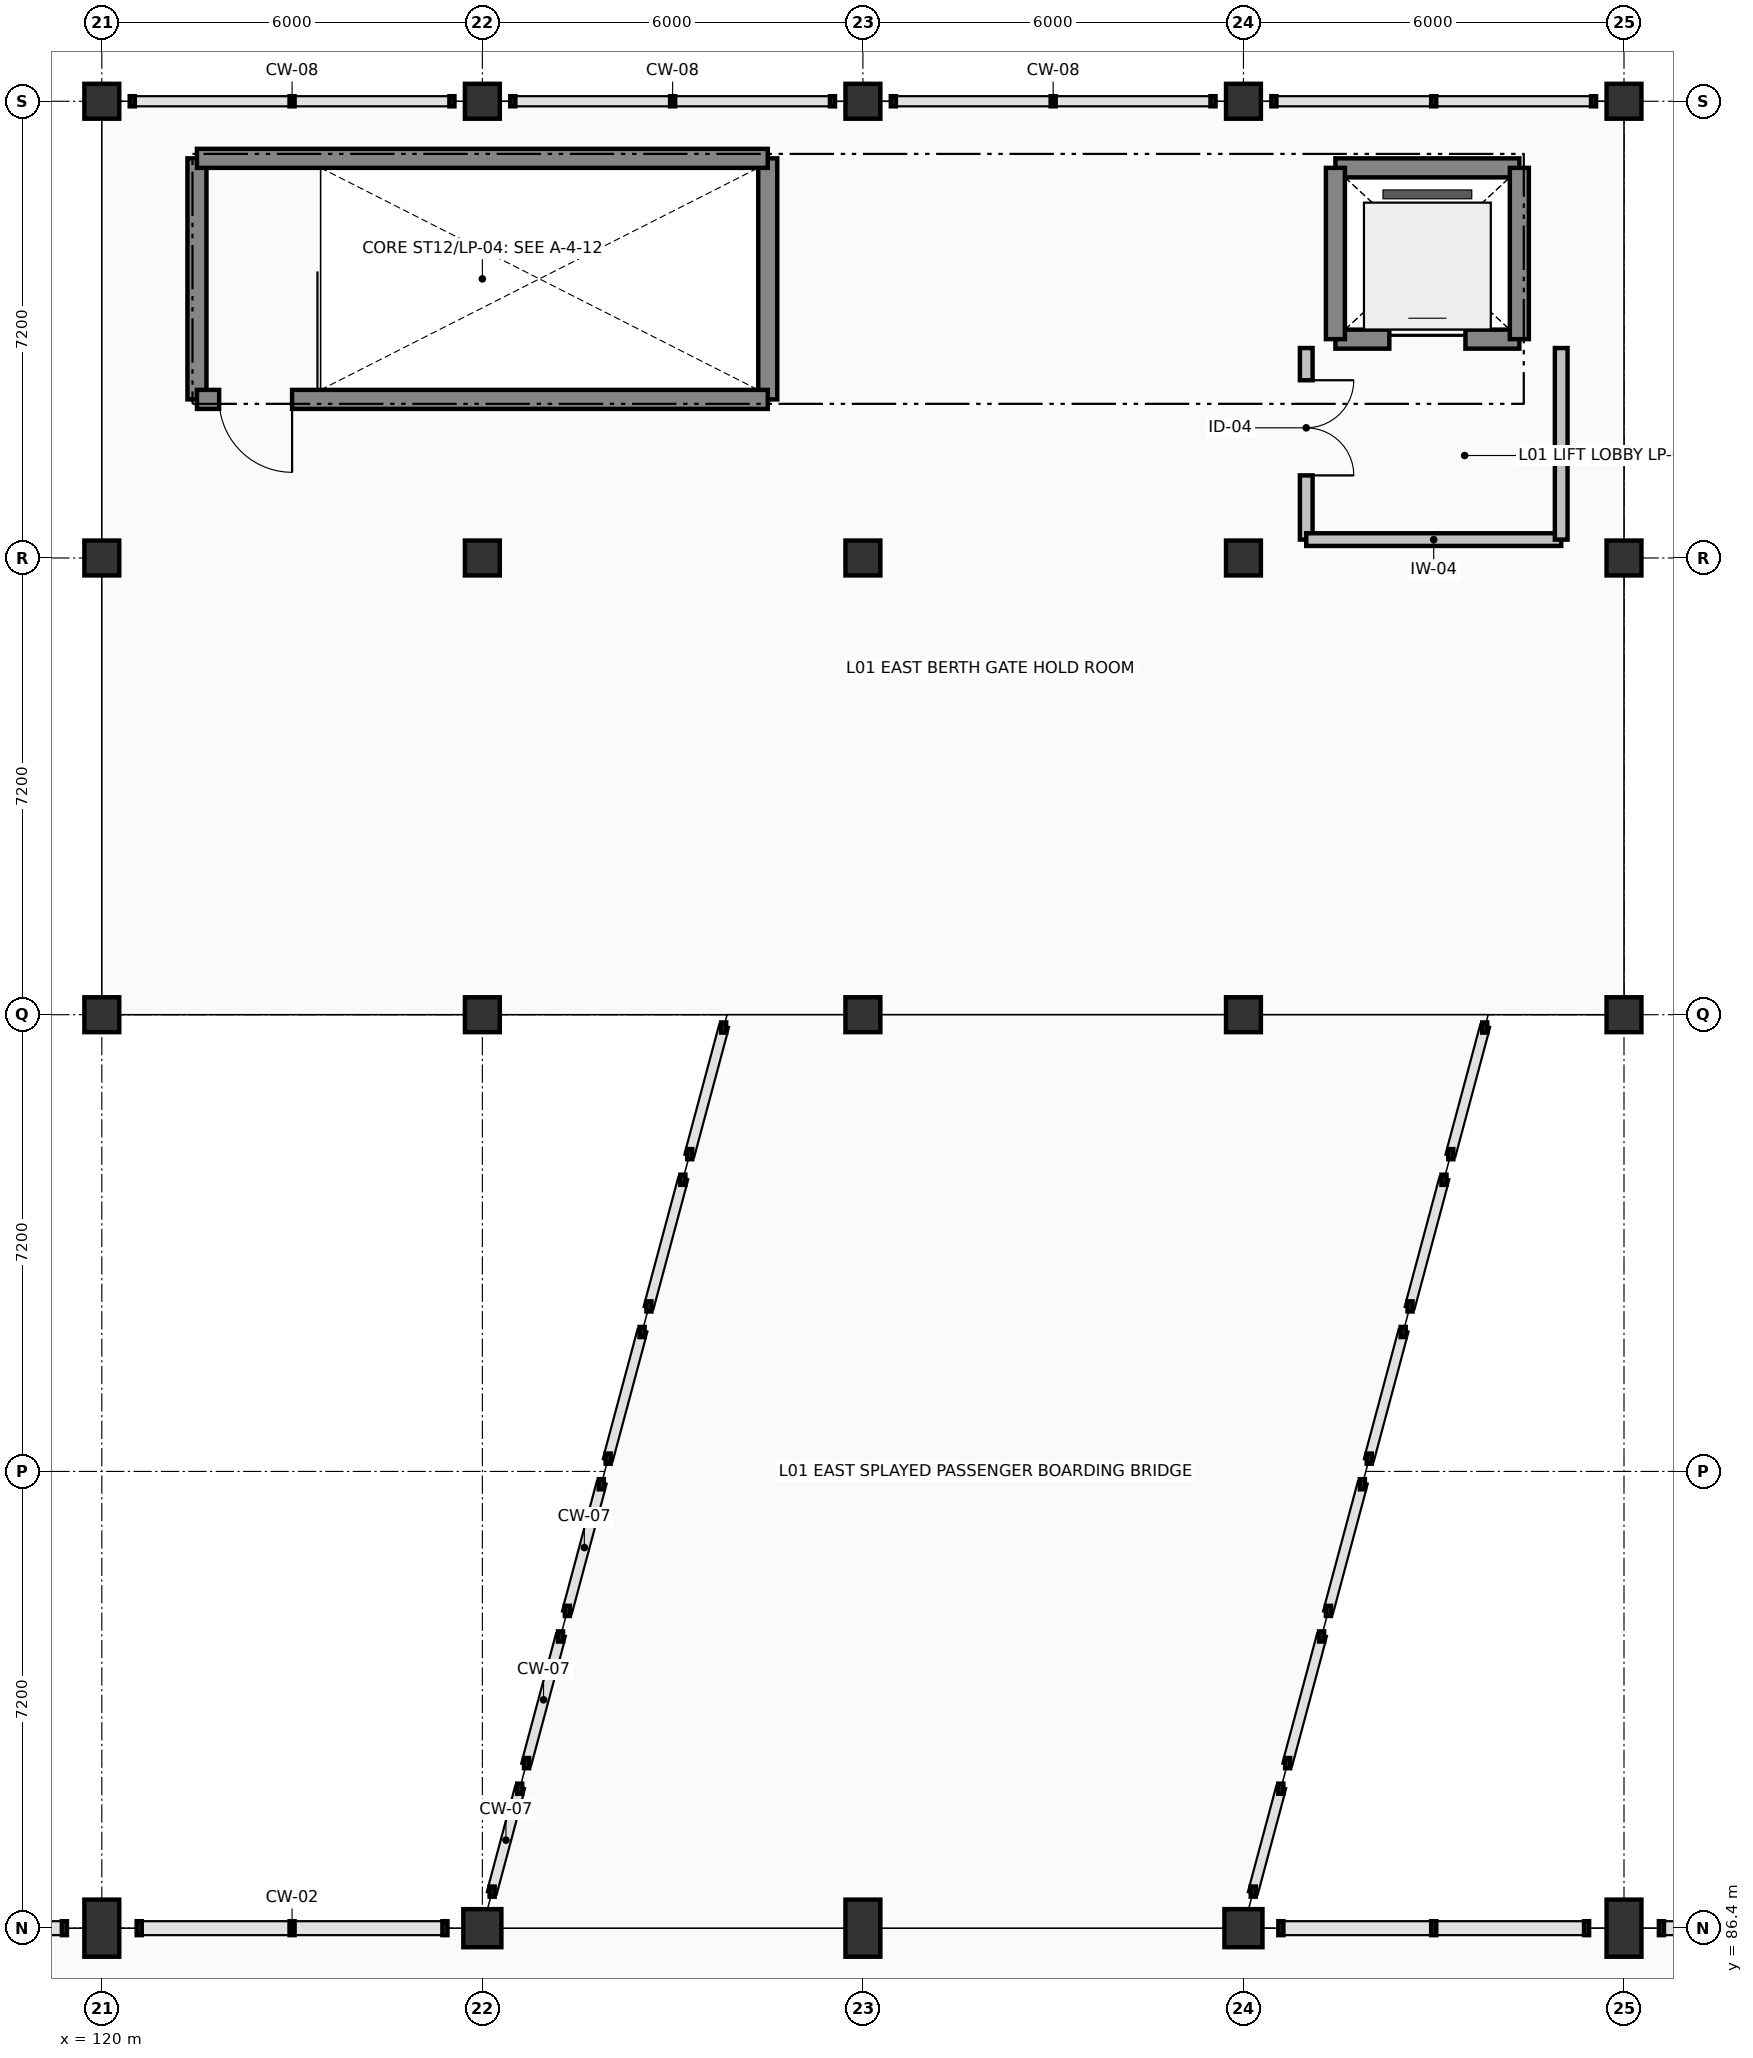
"""IFC4 building model, lengths in metres.
Left out: names, types, materials, properties, quantities, classifications, styles, units other than length and angle.
Written with IfcOpenShell. Run it as: python <this file> out.ifc"""

import sys

from ifc_helpers import new_model, si_unit, direction, frame, frame_2d, origin, origin_2d, place, context, subcontext, project, spatial, rectangle, extrude, element, fill, save


model = new_model("IFC4")
c1 = context("Model", 3, precision=1e-05, world=origin(), true_north=direction((0.0, 1.0)))
c2 = subcontext(c1, "Body", "Model", "MODEL_VIEW")
j1 = project(units=[si_unit("LENGTHUNIT", "METRE"), si_unit("PLANEANGLEUNIT", "RADIAN")], contexts=[c1])
p1 = place(None, origin())
s1 = spatial("IfcSite", under=j1, at=p1, CompositionType="ELEMENT")
p2 = place(p1, origin())
s2 = spatial("IfcBuilding", under=s1, at=p2, CompositionType="ELEMENT")
p3 = place(p2, frame((0.0, 0.0, 5.76)))
s3 = spatial("IfcBuildingStorey", under=s2, at=p3, CompositionType="ELEMENT", Elevation=5.76)
for number, where, z_axis, x_axis in (
    (1, (121.5, 110.5, 0.0), (0.0, 0.0, 1.0), (0.0, 1.0, 0.0)),
    (2, (130.5, 110.5, 0.0), (0.0, 0.0, 1.0), (0.0, 1.0, 0.0)),
):
    element("IfcWall", number, at=place(p3, frame(where, z_axis=z_axis, x_axis=x_axis)), inside=s3, PredefinedType="SHEAR", context=c2, shape_type="SweptSolid", body=[
        extrude(rectangle(XDim=3.8, YDim=0.3, at=frame_2d((1.9, 0.0))), origin(), (0.0, 0.0, 1.0), 3.78),
    ])
p4 = place(p3, frame((120.0, 86.4, 0.0), z_axis=(0.0, 0.0, 1.0), x_axis=(1.0, 0.0, 0.0)))
e3 = element("IfcColumn", 3, at=p4, inside=s3, PredefinedType="COLUMN", context=c2, shape_type="SweptSolid", body=[
    extrude(rectangle(XDim=0.55, YDim=0.9, at=origin_2d()), origin(), (0.0, 0.0, 1.0), 4.08),
])
p5 = place(p3, frame((126.0, 86.4, 0.0), z_axis=(0.0, 0.0, 1.0), x_axis=(1.0, 0.0, 0.0)))
e4 = element("IfcColumn", 4, at=p5, inside=s3, PredefinedType="COLUMN", context=c2, shape_type="SweptSolid", body=[
    extrude(rectangle(XDim=0.6, YDim=0.6, at=origin_2d()), origin(), (0.0, 0.0, 1.0), 4.08),
])
p6 = place(p3, frame((132.0, 86.4, 0.0), z_axis=(0.0, 0.0, 1.0), x_axis=(1.0, 0.0, 0.0)))
e5 = element("IfcColumn", 5, at=p6, inside=s3, PredefinedType="COLUMN", context=c2, shape_type="SweptSolid", body=[
    extrude(rectangle(XDim=0.55, YDim=0.9, at=origin_2d()), origin(), (0.0, 0.0, 1.0), 4.08),
])
p7 = place(p3, frame((138.0, 86.4, 0.0), z_axis=(0.0, 0.0, 1.0), x_axis=(1.0, 0.0, 0.0)))
e6 = element("IfcColumn", 6, at=p7, inside=s3, PredefinedType="COLUMN", context=c2, shape_type="SweptSolid", body=[
    extrude(rectangle(XDim=0.6, YDim=0.6, at=origin_2d()), origin(), (0.0, 0.0, 1.0), 4.08),
])
p8 = place(p3, frame((144.0, 86.4, 0.0), z_axis=(0.0, 0.0, 1.0), x_axis=(1.0, 0.0, 0.0)))
e7 = element("IfcColumn", 7, at=p8, inside=s3, PredefinedType="COLUMN", context=c2, shape_type="SweptSolid", body=[
    extrude(rectangle(XDim=0.55, YDim=0.9, at=origin_2d()), origin(), (0.0, 0.0, 1.0), 4.08),
])
for number, where, z_axis, x_axis in (
    (8, (120.0, 100.8, 0.0), (0.0, 0.0, 1.0), (1.0, 0.0, 0.0)),
    (9, (120.0, 108.0, 0.0), (0.0, 0.0, 1.0), (1.0, 0.0, 0.0)),
    (10, (120.0, 115.2, 0.0), (0.0, 0.0, 1.0), (1.0, 0.0, 0.0)),
    (11, (126.0, 100.8, 0.0), (0.0, 0.0, 1.0), (1.0, 0.0, 0.0)),
    (12, (126.0, 108.0, 0.0), (0.0, 0.0, 1.0), (1.0, 0.0, 0.0)),
    (13, (126.0, 115.2, 0.0), (0.0, 0.0, 1.0), (1.0, 0.0, 0.0)),
    (14, (132.0, 100.8, 0.0), (0.0, 0.0, 1.0), (1.0, 0.0, 0.0)),
    (15, (132.0, 108.0, 0.0), (0.0, 0.0, 1.0), (1.0, 0.0, 0.0)),
    (16, (132.0, 115.2, 0.0), (0.0, 0.0, 1.0), (1.0, 0.0, 0.0)),
    (17, (138.0, 100.8, 0.0), (0.0, 0.0, 1.0), (1.0, 0.0, 0.0)),
    (18, (138.0, 108.0, 0.0), (0.0, 0.0, 1.0), (1.0, 0.0, 0.0)),
    (19, (138.0, 115.2, 0.0), (0.0, 0.0, 1.0), (1.0, 0.0, 0.0)),
    (20, (144.0, 100.8, 0.0), (0.0, 0.0, 1.0), (1.0, 0.0, 0.0)),
    (21, (144.0, 108.0, 0.0), (0.0, 0.0, 1.0), (1.0, 0.0, 0.0)),
    (22, (144.0, 115.2, 0.0), (0.0, 0.0, 1.0), (1.0, 0.0, 0.0)),
):
    element("IfcColumn", number, at=place(p3, frame(where, z_axis=z_axis, x_axis=x_axis)), inside=s3, PredefinedType="COLUMN", context=c2, shape_type="SweptSolid", body=[
        extrude(rectangle(XDim=0.55, YDim=0.55, at=origin_2d()), origin(), (0.0, 0.0, 1.0), 4.08),
    ])
p9 = place(p3, frame((121.5, 114.3, 0.0), z_axis=(0.0, 0.0, 1.0), x_axis=(1.0, 0.0, 0.0)))
e23 = element("IfcWall", 23, at=p9, inside=s3, PredefinedType="SHEAR", context=c2, shape_type="SweptSolid", body=[
    extrude(rectangle(XDim=9.0, YDim=0.3, at=frame_2d((4.5, 0.0))), origin(), (0.0, 0.0, 1.0), 3.78),
])
p10 = place(p3, frame((121.5, 110.5, 0.0), z_axis=(0.0, 0.0, 1.0), x_axis=(1.0, 0.0, 0.0)))
e24 = element("IfcWall", 24, at=p10, inside=s3, PredefinedType="SHEAR", context=c2, shape_type="SweptSolid", body=[
    extrude(rectangle(XDim=9.0, YDim=0.3, at=frame_2d((4.5, 0.0))), origin(), (0.0, 0.0, 1.0), 3.78),
])
p11 = place(p10, frame((0.35, 0.0, 0.0)))
e25 = element("IfcOpeningElement", 25, at=p11, cuts=e24, PredefinedType="OPENING", context=c2, shape_type="SweptSolid", body=[
    extrude(rectangle(XDim=1.15, YDim=2.15, at=frame_2d((0.575, 1.075))), frame((0.0, 0.16, 0.0), z_axis=(0.0, -1.0, 0.0), x_axis=(1.0, 0.0, 0.0)), (0.0, 0.0, 1.0), 0.32),
])
p12 = place(p3, frame((139.45, 111.45, 0.0), z_axis=(0.0, 0.0, 1.0), x_axis=(1.0, 0.0, 0.0)))
e26 = element("IfcWall", 26, at=p12, inside=s3, PredefinedType="SHEAR", context=c2, shape_type="SweptSolid", body=[
    extrude(rectangle(XDim=2.9, YDim=0.3, at=frame_2d((1.45, 0.0))), origin(), (0.0, 0.0, 1.0), 3.78),
])
p13 = place(p12, frame((0.85, 0.0, 0.0)))
e27 = element("IfcOpeningElement", 27, at=p13, cuts=e26, PredefinedType="OPENING", context=c2, shape_type="SweptSolid", body=[
    extrude(rectangle(XDim=1.2, YDim=2.15, at=frame_2d((0.6, 1.075))), frame((0.0, 0.16, 0.0), z_axis=(0.0, -1.0, 0.0), x_axis=(1.0, 0.0, 0.0)), (0.0, 0.0, 1.0), 0.32),
])
p14 = place(p3, frame((139.45, 114.15, 0.0), z_axis=(0.0, 0.0, 1.0), x_axis=(1.0, 0.0, 0.0)))
e28 = element("IfcWall", 28, at=p14, inside=s3, PredefinedType="SHEAR", context=c2, shape_type="SweptSolid", body=[
    extrude(rectangle(XDim=2.9, YDim=0.3, at=frame_2d((1.45, 0.0))), origin(), (0.0, 0.0, 1.0), 3.78),
])
for number, where, z_axis, x_axis in (
    (29, (139.45, 111.45, 0.0), (0.0, 0.0, 1.0), (0.0, 1.0, 0.0)),
    (30, (142.35, 111.45, 0.0), (0.0, 0.0, 1.0), (0.0, 1.0, 0.0)),
):
    element("IfcWall", number, at=place(p3, frame(where, z_axis=z_axis, x_axis=x_axis)), inside=s3, PredefinedType="SHEAR", context=c2, shape_type="SweptSolid", body=[
        extrude(rectangle(XDim=2.7, YDim=0.3, at=frame_2d((1.35, 0.0))), origin(), (0.0, 0.0, 1.0), 3.78),
    ])
p15 = place(p3, frame((138.99, 111.31, 0.0), z_axis=(0.0, 0.0, 1.0), x_axis=(0.0, -1.0, 0.0)))
e31 = element("IfcWall", 31, at=p15, inside=s3, PredefinedType="PARTITIONING", context=c2, shape_type="SweptSolid", body=[
    extrude(rectangle(XDim=3.02, YDim=0.2, at=frame_2d((1.51, 0.0))), origin(), (0.0, 0.0, 1.0), 3.82),
])
p16 = place(p15, frame((0.508, 0.0, 0.0)))
e32 = element("IfcOpeningElement", 32, at=p16, cuts=e31, PredefinedType="OPENING", context=c2, shape_type="SweptSolid", body=[
    extrude(rectangle(XDim=1.5, YDim=2.2, at=frame_2d((0.75, 1.1))), frame((0.0, 0.11, 0.0), z_axis=(0.0, -1.0, 0.0), x_axis=(1.0, 0.0, 0.0)), (0.0, 0.0, 1.0), 0.22),
])
p17 = place(p3, frame((138.99, 108.29, 0.0), z_axis=(0.0, 0.0, 1.0), x_axis=(1.0, 0.0, 0.0)))
e33 = element("IfcWall", 33, at=p17, inside=s3, PredefinedType="PARTITIONING", context=c2, shape_type="SweptSolid", body=[
    extrude(rectangle(XDim=4.02, YDim=0.2, at=frame_2d((2.01, 0.0))), origin(), (0.0, 0.0, 1.0), 3.18),
])
p18 = place(p3, frame((143.01, 108.29, 0.0), z_axis=(0.0, 0.0, 1.0), x_axis=(0.0, 1.0, 0.0)))
e34 = element("IfcWall", 34, at=p18, inside=s3, PredefinedType="PARTITIONING", context=c2, shape_type="SweptSolid", body=[
    extrude(rectangle(XDim=3.02, YDim=0.2, at=frame_2d((1.51, 0.0))), origin(), (0.0, 0.0, 1.0), 3.82),
])
p19 = place(p11, frame((1.15, 0.0, 0.0), z_axis=(0.0, 0.0, 1.0), x_axis=(-1.0, 0.0, 0.0)))
e35 = element("IfcDoor", 35, at=p19, inside=s3, OperationType="SINGLE_SWING_LEFT", PredefinedType="DOOR", context=c2, shape_type="SweptSolid", body=[
    extrude(rectangle(XDim=1.15, YDim=2.15, at=frame_2d((0.575, 1.075))), frame((0.0, 0.025, 0.0), z_axis=(0.0, -1.0, 0.0), x_axis=(1.0, 0.0, 0.0)), (0.0, 0.0, 1.0), 0.05),
])
fill(e25, e35)
p20 = place(p13, origin())
e36 = element("IfcDoor", 36, at=p20, inside=s3, OperationType="SLIDING_TO_LEFT", PredefinedType="DOOR", context=c2, shape_type="SweptSolid", body=[
    extrude(rectangle(XDim=1.2, YDim=2.15, at=frame_2d((0.6, 1.075))), frame((0.0, 0.025, 0.0), z_axis=(0.0, -1.0, 0.0), x_axis=(1.0, 0.0, 0.0)), (0.0, 0.0, 1.0), 0.05),
])
fill(e27, e36)
p21 = place(p16, origin())
e37 = element("IfcDoor", 37, at=p21, inside=s3, OperationType="DOUBLE_SWING_LEFT", PredefinedType="DOOR", context=c2, shape_type="SweptSolid", body=[
    extrude(rectangle(XDim=1.5, YDim=2.2, at=frame_2d((0.75, 1.1))), frame((0.0, 0.025, 0.0), z_axis=(0.0, -1.0, 0.0), x_axis=(1.0, 0.0, 0.0)), (0.0, 0.0, 1.0), 0.05),
])
fill(e32, e37)
save(model, sys.argv[1])
